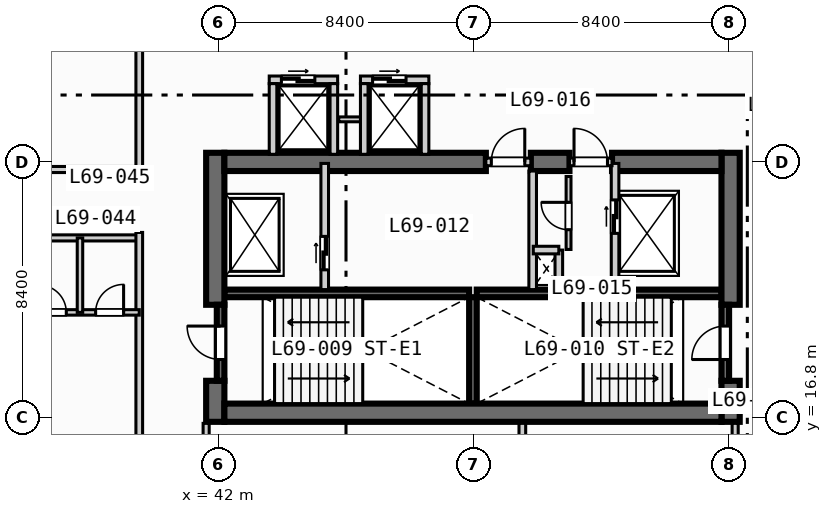
"""IFC4 building model, lengths in metres.
Left out: names, types, materials, properties, quantities, classifications, styles, units other than length and angle.
Written with IfcOpenShell. Run it as: python <this file> out.ifc"""

import sys

from ifc_helpers import new_model, si_unit, direction, frame, frame_2d, origin, place, context, subcontext, project, spatial, rectangle, extrude, element, fill, save


model = new_model("IFC4")
c1 = context("Model", 3, precision=1e-05, world=origin(), true_north=direction((0.0, 1.0)))
c2 = subcontext(c1, "Body", "Model", "MODEL_VIEW")
j1 = project(units=[si_unit("LENGTHUNIT", "METRE"), si_unit("PLANEANGLEUNIT", "RADIAN")], contexts=[c1])
p1 = place(None, origin())
s1 = spatial("IfcSite", under=j1, at=p1, CompositionType="ELEMENT")
p2 = place(p1, origin())
s2 = spatial("IfcBuilding", under=s1, at=p2, CompositionType="ELEMENT")
p3 = place(p2, frame((0.0, 0.0, 278.6)))
s3 = spatial("IfcBuildingStorey", under=s2, at=p3, CompositionType="ELEMENT", Elevation=278.6)
for number, where, z_axis, x_axis in (
    (1, (42.2, 20.875, 0.0), (0.0, 0.0, 1.0), (1.0, 0.0, 0.0)),
    (2, (50.5, 20.875, 0.0), (0.0, 0.0, 1.0), (1.0, 0.0, 0.0)),
):
    element("IfcWall", number, at=place(p3, frame(where, z_axis=z_axis, x_axis=x_axis)), inside=s3, PredefinedType="SOLIDWALL", context=c2, shape_type="SweptSolid", body=[
        extrude(rectangle(XDim=8.05, YDim=0.25, at=frame_2d((4.025, 0.0))), origin(), (0.0, 0.0, 1.0), 3.47),
    ])
p4 = place(p3, frame((50.375, 17.25, 0.0), z_axis=(0.0, 0.0, 1.0), x_axis=(0.0, 1.0, 0.0)))
e3 = element("IfcWall", 3, at=p4, inside=s3, PredefinedType="SOLIDWALL", context=c2, shape_type="SweptSolid", body=[
    extrude(rectangle(XDim=3.5, YDim=0.25, at=frame_2d((1.75, 0.0))), origin(), (0.0, 0.0, 1.0), 3.47),
])
p5 = place(p3, frame((41.9, 16.65, 0.0), z_axis=(0.0, 0.0, 1.0), x_axis=(0.0, 1.0, 0.0)))
e4 = element("IfcWall", 4, at=p5, inside=s3, PredefinedType="SHEAR", context=c2, shape_type="SweptSolid", body=[
    extrude(rectangle(XDim=1.35, YDim=0.6, at=frame_2d((0.675, 0.0))), origin(), (0.0, 0.0, 1.0), 3.47),
])
p6 = place(p3, frame((41.9, 20.5, 0.0), z_axis=(0.0, 0.0, 1.0), x_axis=(0.0, 1.0, 0.0)))
e5 = element("IfcWall", 5, at=p6, inside=s3, PredefinedType="SHEAR", context=c2, shape_type="SweptSolid", body=[
    extrude(rectangle(XDim=5.0, YDim=0.6, at=frame_2d((2.5, 0.0))), origin(), (0.0, 0.0, 1.0), 3.47),
])
p7 = place(p3, frame((58.85, 16.65, 0.0), z_axis=(0.0, 0.0, 1.0), x_axis=(0.0, 1.0, 0.0)))
e6 = element("IfcWall", 6, at=p7, inside=s3, PredefinedType="SHEAR", context=c2, shape_type="SweptSolid", body=[
    extrude(rectangle(XDim=1.35, YDim=0.6, at=frame_2d((0.675, 0.0))), origin(), (0.0, 0.0, 1.0), 3.47),
])
p8 = place(p3, frame((58.85, 20.5, 0.0), z_axis=(0.0, 0.0, 1.0), x_axis=(0.0, 1.0, 0.0)))
e7 = element("IfcWall", 7, at=p8, inside=s3, PredefinedType="SHEAR", context=c2, shape_type="SweptSolid", body=[
    extrude(rectangle(XDim=5.0, YDim=0.6, at=frame_2d((2.5, 0.0))), origin(), (0.0, 0.0, 1.0), 3.47),
])
p9 = place(p3, frame((42.2, 16.95, 0.0), z_axis=(0.0, 0.0, 1.0), x_axis=(1.0, 0.0, 0.0)))
e8 = element("IfcWall", 8, at=p9, inside=s3, PredefinedType="SHEAR", context=c2, shape_type="SweptSolid", body=[
    extrude(rectangle(XDim=16.35, YDim=0.6, at=frame_2d((8.175, 0.0))), origin(), (0.0, 0.0, 1.0), 3.47),
])
p10 = place(p3, frame((42.2, 25.2, 0.0), z_axis=(0.0, 0.0, 1.0), x_axis=(1.0, 0.0, 0.0)))
e9 = element("IfcWall", 9, at=p10, inside=s3, PredefinedType="SHEAR", context=c2, shape_type="SweptSolid", body=[
    extrude(rectangle(XDim=8.6, YDim=0.6, at=frame_2d((4.3, 0.0))), origin(), (0.0, 0.0, 1.0), 3.47),
])
p11 = place(p3, frame((52.28, 25.2, 0.0), z_axis=(0.0, 0.0, 1.0), x_axis=(1.0, 0.0, 0.0)))
e10 = element("IfcWall", 10, at=p11, inside=s3, PredefinedType="SHEAR", context=c2, shape_type="SweptSolid", body=[
    extrude(rectangle(XDim=1.27, YDim=0.6, at=frame_2d((0.635, 0.0))), origin(), (0.0, 0.0, 1.0), 3.47),
])
p12 = place(p3, frame((54.95, 25.2, 0.0), z_axis=(0.0, 0.0, 1.0), x_axis=(1.0, 0.0, 0.0)))
e11 = element("IfcWall", 11, at=p12, inside=s3, PredefinedType="SHEAR", context=c2, shape_type="SweptSolid", body=[
    extrude(rectangle(XDim=3.6, YDim=0.6, at=frame_2d((1.8, 0.0))), origin(), (0.0, 0.0, 1.0), 3.47),
])
p13 = place(p3, frame((42.075, 18.0, 0.0), z_axis=(0.0, 0.0, 1.0), x_axis=(0.0, 1.0, 0.0)))
e12 = element("IfcWall", 12, at=p13, inside=s3, PredefinedType="SOLIDWALL", context=c2, shape_type="SweptSolid", body=[
    extrude(rectangle(XDim=2.5, YDim=0.25, at=frame_2d((1.25, 0.0))), origin(), (0.0, 0.0, 1.0), 3.47),
])
p14 = place(p13, frame((0.7, 0.0, 0.0)))
e13 = element("IfcOpeningElement", 13, at=p14, cuts=e12, PredefinedType="OPENING", context=c2, shape_type="SweptSolid", body=[
    extrude(rectangle(XDim=1.1, YDim=2.15, at=frame_2d((0.55, 1.075))), frame((0.0, 0.135, 0.0), z_axis=(0.0, -1.0, 0.0), x_axis=(1.0, 0.0, 0.0)), (0.0, 0.0, 1.0), 0.27),
])
p15 = place(p3, frame((58.675, 18.0, 0.0), z_axis=(0.0, 0.0, 1.0), x_axis=(0.0, 1.0, 0.0)))
e14 = element("IfcWall", 14, at=p15, inside=s3, PredefinedType="SOLIDWALL", context=c2, shape_type="SweptSolid", body=[
    extrude(rectangle(XDim=2.5, YDim=0.25, at=frame_2d((1.25, 0.0))), origin(), (0.0, 0.0, 1.0), 3.47),
])
p16 = place(p15, frame((0.7, 0.0, 0.0)))
e15 = element("IfcOpeningElement", 15, at=p16, cuts=e14, PredefinedType="OPENING", context=c2, shape_type="SweptSolid", body=[
    extrude(rectangle(XDim=1.1, YDim=2.15, at=frame_2d((0.55, 1.075))), frame((0.0, 0.135, 0.0), z_axis=(0.0, -1.0, 0.0), x_axis=(1.0, 0.0, 0.0)), (0.0, 0.0, 1.0), 0.27),
])
p17 = place(p3, frame((45.5, 21.0, 0.0), z_axis=(0.0, 0.0, 1.0), x_axis=(0.0, 1.0, 0.0)))
e16 = element("IfcWall", 16, at=p17, inside=s3, PredefinedType="SOLIDWALL", context=c2, shape_type="SweptSolid", body=[
    extrude(rectangle(XDim=4.15, YDim=0.25, at=frame_2d((2.075, 0.0))), origin(), (0.0, 0.0, 1.0), 3.47),
])
p18 = place(p17, frame((0.65, 0.0, 0.0)))
e17 = element("IfcOpeningElement", 17, at=p18, cuts=e16, PredefinedType="OPENING", context=c2, shape_type="SweptSolid", body=[
    extrude(rectangle(XDim=1.1, YDim=2.15, at=frame_2d((0.55, 1.075))), frame((0.0, 0.135, 0.0), z_axis=(0.0, -1.0, 0.0), x_axis=(1.0, 0.0, 0.0)), (0.0, 0.0, 1.0), 0.27),
])
p19 = place(p3, frame((50.8, 25.2, 0.0), z_axis=(0.0, 0.0, 1.0), x_axis=(1.0, 0.0, 0.0)))
e18 = element("IfcWall", 18, at=p19, inside=s3, PredefinedType="SOLIDWALL", context=c2, shape_type="SweptSolid", body=[
    extrude(rectangle(XDim=1.48, YDim=0.25, at=frame_2d((0.74, 0.0))), origin(), (0.0, 0.0, 1.0), 3.47),
])
p20 = place(p19, frame((0.18, 0.0, 0.0)))
e19 = element("IfcOpeningElement", 19, at=p20, cuts=e18, PredefinedType="OPENING", context=c2, shape_type="SweptSolid", body=[
    extrude(rectangle(XDim=1.1, YDim=2.15, at=frame_2d((0.55, 1.075))), frame((0.0, 0.135, 0.0), z_axis=(0.0, -1.0, 0.0), x_axis=(1.0, 0.0, 0.0)), (0.0, 0.0, 1.0), 0.27),
])
p21 = place(p3, frame((52.34, 21.0, 0.0), z_axis=(0.0, 0.0, 1.0), x_axis=(0.0, 1.0, 0.0)))
e20 = element("IfcWall", 20, at=p21, inside=s3, PredefinedType="SOLIDWALL", context=c2, shape_type="SweptSolid", body=[
    extrude(rectangle(XDim=3.9, YDim=0.25, at=frame_2d((1.95, 0.0))), origin(), (0.0, 0.0, 1.0), 3.47),
])
p22 = place(p3, frame((55.05, 21.0, 0.0), z_axis=(0.0, 0.0, 1.0), x_axis=(0.0, 1.0, 0.0)))
e21 = element("IfcWall", 21, at=p22, inside=s3, PredefinedType="SOLIDWALL", context=c2, shape_type="SweptSolid", body=[
    extrude(rectangle(XDim=4.15, YDim=0.25, at=frame_2d((2.075, 0.0))), origin(), (0.0, 0.0, 1.0), 3.47),
])
p23 = place(p22, frame((1.85, 0.0, 0.0)))
e22 = element("IfcOpeningElement", 22, at=p23, cuts=e21, PredefinedType="OPENING", context=c2, shape_type="SweptSolid", body=[
    extrude(rectangle(XDim=1.1, YDim=2.15, at=frame_2d((0.55, 1.075))), frame((0.0, 0.135, 0.0), z_axis=(0.0, -1.0, 0.0), x_axis=(1.0, 0.0, 0.0)), (0.0, 0.0, 1.0), 0.27),
])
p24 = place(p3, frame((53.55, 25.2, 0.0), z_axis=(0.0, 0.0, 1.0), x_axis=(1.0, 0.0, 0.0)))
e23 = element("IfcWall", 23, at=p24, inside=s3, PredefinedType="SOLIDWALL", context=c2, shape_type="SweptSolid", body=[
    extrude(rectangle(XDim=1.4, YDim=0.25, at=frame_2d((0.7, 0.0))), origin(), (0.0, 0.0, 1.0), 3.47),
])
p25 = place(p24, frame((0.15, 0.0, 0.0)))
e24 = element("IfcOpeningElement", 24, at=p25, cuts=e23, PredefinedType="OPENING", context=c2, shape_type="SweptSolid", body=[
    extrude(rectangle(XDim=1.1, YDim=2.15, at=frame_2d((0.55, 1.075))), frame((0.0, 0.135, 0.0), z_axis=(0.0, -1.0, 0.0), x_axis=(1.0, 0.0, 0.0)), (0.0, 0.0, 1.0), 0.27),
])
p26 = place(p3, frame((53.2, 21.0, 0.0), z_axis=(0.0, 0.0, 1.0), x_axis=(0.0, 1.0, 0.0)))
e25 = element("IfcWall", 25, at=p26, inside=s3, PredefinedType="SOLIDWALL", context=c2, shape_type="SweptSolid", body=[
    extrude(rectangle(XDim=1.3, YDim=0.25, at=frame_2d((0.65, 0.0))), origin(), (0.0, 0.0, 1.0), 3.47),
])
p27 = place(p3, frame((52.36, 22.3, 0.0), z_axis=(0.0, 0.0, 1.0), x_axis=(1.0, 0.0, 0.0)))
e26 = element("IfcWall", 26, at=p27, inside=s3, PredefinedType="SOLIDWALL", context=c2, shape_type="SweptSolid", body=[
    extrude(rectangle(XDim=0.84, YDim=0.25, at=frame_2d((0.42, 0.0))), origin(), (0.0, 0.0, 1.0), 3.47),
])
p28 = place(p3, frame((53.52, 22.32, 0.0), z_axis=(0.0, 0.0, 1.0), x_axis=(0.0, 1.0, 0.0)))
e27 = element("IfcWall", 27, at=p28, inside=s3, PredefinedType="PARTITIONING", context=c2, shape_type="SweptSolid", body=[
    extrude(rectangle(XDim=2.4, YDim=0.16, at=frame_2d((1.2, 0.0))), origin(), (0.0, 0.0, 1.0), 3.47),
])
p29 = place(p28, frame((0.65, 0.0, 0.0)))
e28 = element("IfcOpeningElement", 28, at=p29, cuts=e27, PredefinedType="OPENING", context=c2, shape_type="SweptSolid", body=[
    extrude(rectangle(XDim=0.9, YDim=2.1, at=frame_2d((0.45, 1.05))), frame((0.0, 0.09, 0.0), z_axis=(0.0, -1.0, 0.0), x_axis=(1.0, 0.0, 0.0)), (0.0, 0.0, 1.0), 0.18),
])
p30 = place(p3, frame((43.675, 27.9, 0.0), z_axis=(0.0, 0.0, 1.0), x_axis=(1.0, 0.0, 0.0)))
e29 = element("IfcWall", 29, at=p30, inside=s3, PredefinedType="SOLIDWALL", context=c2, shape_type="SweptSolid", body=[
    extrude(rectangle(XDim=2.25, YDim=0.25, at=frame_2d((1.125, 0.0))), origin(), (0.0, 0.0, 1.0), 3.47),
])
p31 = place(p30, frame((0.4, 0.0, 0.0)))
e30 = element("IfcOpeningElement", 30, at=p31, cuts=e29, PredefinedType="OPENING", context=c2, shape_type="SweptSolid", body=[
    extrude(rectangle(XDim=1.1, YDim=2.15, at=frame_2d((0.55, 1.075))), frame((0.0, 0.135, 0.0), z_axis=(0.0, -1.0, 0.0), x_axis=(1.0, 0.0, 0.0)), (0.0, 0.0, 1.0), 0.27),
])
for number, where, z_axis, x_axis in (
    (31, (43.8, 25.45, 0.0), (0.0, 0.0, 1.0), (0.0, 1.0, 0.0)),
    (32, (45.8, 25.45, 0.0), (0.0, 0.0, 1.0), (0.0, 1.0, 0.0)),
):
    element("IfcWall", number, at=place(p3, frame(where, z_axis=z_axis, x_axis=x_axis)), inside=s3, PredefinedType="SOLIDWALL", context=c2, shape_type="SweptSolid", body=[
        extrude(rectangle(XDim=2.325, YDim=0.25, at=frame_2d((1.163, 0.0))), origin(), (0.0, 0.0, 1.0), 3.47),
    ])
p32 = place(p3, frame((45.96, 26.6, 0.0), z_axis=(0.0, 0.0, 1.0), x_axis=(1.0, 0.0, 0.0)))
e33 = element("IfcWall", 33, at=p32, inside=s3, PredefinedType="PARTITIONING", context=c2, shape_type="SweptSolid", body=[
    extrude(rectangle(XDim=0.88, YDim=0.16, at=frame_2d((0.44, 0.0))), origin(), (0.0, 0.0, 1.0), 3.47),
])
p33 = place(p3, frame((46.675, 27.9, 0.0), z_axis=(0.0, 0.0, 1.0), x_axis=(1.0, 0.0, 0.0)))
e34 = element("IfcWall", 34, at=p33, inside=s3, PredefinedType="SOLIDWALL", context=c2, shape_type="SweptSolid", body=[
    extrude(rectangle(XDim=2.25, YDim=0.25, at=frame_2d((1.125, 0.0))), origin(), (0.0, 0.0, 1.0), 3.47),
])
p34 = place(p33, frame((0.4, 0.0, 0.0)))
e35 = element("IfcOpeningElement", 35, at=p34, cuts=e34, PredefinedType="OPENING", context=c2, shape_type="SweptSolid", body=[
    extrude(rectangle(XDim=1.1, YDim=2.15, at=frame_2d((0.55, 1.075))), frame((0.0, 0.135, 0.0), z_axis=(0.0, -1.0, 0.0), x_axis=(1.0, 0.0, 0.0)), (0.0, 0.0, 1.0), 0.27),
])
for number, where, z_axis, x_axis in (
    (36, (46.8, 25.45, 0.0), (0.0, 0.0, 1.0), (0.0, 1.0, 0.0)),
    (37, (48.8, 25.45, 0.0), (0.0, 0.0, 1.0), (0.0, 1.0, 0.0)),
):
    element("IfcWall", number, at=place(p3, frame(where, z_axis=z_axis, x_axis=x_axis)), inside=s3, PredefinedType="SOLIDWALL", context=c2, shape_type="SweptSolid", body=[
        extrude(rectangle(XDim=2.325, YDim=0.25, at=frame_2d((1.163, 0.0))), origin(), (0.0, 0.0, 1.0), 3.47),
    ])
p35 = place(p3, frame((30.6, 24.95, 0.0), z_axis=(0.0, 0.0, 1.0), x_axis=(1.0, 0.0, 0.0)))
e38 = element("IfcWall", 38, at=p35, inside=s3, PredefinedType="PARTITIONING", context=c2, shape_type="SweptSolid", body=[
    extrude(rectangle(XDim=8.8, YDim=0.2, at=frame_2d((4.4, 0.0))), origin(), (0.0, 0.0, 1.0), 2.82),
])
p36 = place(p35, frame((3.75, 0.0, 0.0)))
e39 = element("IfcOpeningElement", 39, at=p36, cuts=e38, PredefinedType="OPENING", context=c2, shape_type="SweptSolid", body=[
    extrude(rectangle(XDim=0.92, YDim=2.1, at=frame_2d((0.46, 1.05))), frame((0.0, 0.11, 0.0), z_axis=(0.0, -1.0, 0.0), x_axis=(1.0, 0.0, 0.0)), (0.0, 0.0, 1.0), 0.22),
])
p37 = place(p3, frame((39.4, 24.95, 0.0), z_axis=(0.0, 0.0, 1.0), x_axis=(0.0, 1.0, 0.0)))
e40 = element("IfcWall", 40, at=p37, inside=s3, PredefinedType="PARTITIONING", context=c2, shape_type="SweptSolid", body=[
    extrude(rectangle(XDim=8.35, YDim=0.22, at=frame_2d((4.175, 0.0))), origin(), (0.0, 0.0, 1.0), 3.47),
])
p38 = place(p3, frame((41.6, 8.65, 0.0), z_axis=(0.0, 0.0, 1.0), x_axis=(0.0, 1.0, 0.0)))
e41 = element("IfcWall", 41, at=p38, inside=s3, PredefinedType="PARTITIONING", context=c2, shape_type="SweptSolid", body=[
    extrude(rectangle(XDim=7.95, YDim=0.2, at=frame_2d((3.975, 0.0))), origin(), (0.0, 0.0, 1.0), 3.47),
])
p39 = place(p38, frame((2.2, 0.0, 0.0)))
e42 = element("IfcOpeningElement", 42, at=p39, cuts=e41, PredefinedType="OPENING", context=c2, shape_type="SweptSolid", body=[
    extrude(rectangle(XDim=0.92, YDim=2.1, at=frame_2d((0.46, 1.05))), frame((0.0, 0.11, 0.0), z_axis=(0.0, -1.0, 0.0), x_axis=(1.0, 0.0, 0.0)), (0.0, 0.0, 1.0), 0.22),
])
p40 = place(p3, frame((59.0, 8.65, 0.0), z_axis=(0.0, 0.0, 1.0), x_axis=(0.0, 1.0, 0.0)))
e43 = element("IfcWall", 43, at=p40, inside=s3, PredefinedType="PARTITIONING", context=c2, shape_type="SweptSolid", body=[
    extrude(rectangle(XDim=7.95, YDim=0.2, at=frame_2d((3.975, 0.0))), origin(), (0.0, 0.0, 1.0), 2.82),
])
p41 = place(p40, frame((2.2, 0.0, 0.0)))
e44 = element("IfcOpeningElement", 44, at=p41, cuts=e43, PredefinedType="OPENING", context=c2, shape_type="SweptSolid", body=[
    extrude(rectangle(XDim=0.92, YDim=2.1, at=frame_2d((0.46, 1.05))), frame((0.0, 0.11, 0.0), z_axis=(0.0, -1.0, 0.0), x_axis=(1.0, 0.0, 0.0)), (0.0, 0.0, 1.0), 0.22),
])
p42 = place(p3, frame((52.0, 8.65, 0.0), z_axis=(0.0, 0.0, 1.0), x_axis=(0.0, 1.0, 0.0)))
e45 = element("IfcWall", 45, at=p42, inside=s3, PredefinedType="PARTITIONING", context=c2, shape_type="SweptSolid", body=[
    extrude(rectangle(XDim=7.95, YDim=0.22, at=frame_2d((3.975, 0.0))), origin(), (0.0, 0.0, 1.0), 3.47),
])
p43 = place(p3, frame((11.8, 22.7, 0.0), z_axis=(0.0, 0.0, 1.0), x_axis=(1.0, 0.0, 0.0)))
e46 = element("IfcWall", 46, at=p43, inside=s3, PredefinedType="PARTITIONING", context=c2, shape_type="SweptSolid", body=[
    extrude(rectangle(XDim=27.6, YDim=0.2, at=frame_2d((13.8, 0.0))), origin(), (0.0, 0.0, 1.0), 3.47),
])
p44 = place(p43, frame((0.445, 0.0, 0.0)))
e47 = element("IfcOpeningElement", 47, at=p44, cuts=e46, PredefinedType="OPENING", context=c2, shape_type="SweptSolid", body=[
    extrude(rectangle(XDim=1.0, YDim=2.15, at=frame_2d((0.5, 1.075))), frame((0.0, 0.11, 0.0), z_axis=(0.0, -1.0, 0.0), x_axis=(1.0, 0.0, 0.0)), (0.0, 0.0, 1.0), 0.22),
])
p45 = place(p43, frame((5.945, 0.0, 0.0)))
e48 = element("IfcOpeningElement", 48, at=p45, cuts=e46, PredefinedType="OPENING", context=c2, shape_type="SweptSolid", body=[
    extrude(rectangle(XDim=1.0, YDim=2.15, at=frame_2d((0.5, 1.075))), frame((0.0, 0.11, 0.0), z_axis=(0.0, -1.0, 0.0), x_axis=(1.0, 0.0, 0.0)), (0.0, 0.0, 1.0), 0.22),
])
p46 = place(p43, frame((11.445, 0.0, 0.0)))
e49 = element("IfcOpeningElement", 49, at=p46, cuts=e46, PredefinedType="OPENING", context=c2, shape_type="SweptSolid", body=[
    extrude(rectangle(XDim=1.0, YDim=2.15, at=frame_2d((0.5, 1.075))), frame((0.0, 0.11, 0.0), z_axis=(0.0, -1.0, 0.0), x_axis=(1.0, 0.0, 0.0)), (0.0, 0.0, 1.0), 0.22),
])
p47 = place(p43, frame((16.945, 0.0, 0.0)))
e50 = element("IfcOpeningElement", 50, at=p47, cuts=e46, PredefinedType="OPENING", context=c2, shape_type="SweptSolid", body=[
    extrude(rectangle(XDim=1.0, YDim=2.15, at=frame_2d((0.5, 1.075))), frame((0.0, 0.11, 0.0), z_axis=(0.0, -1.0, 0.0), x_axis=(1.0, 0.0, 0.0)), (0.0, 0.0, 1.0), 0.22),
])
p48 = place(p43, frame((22.445, 0.0, 0.0)))
e51 = element("IfcOpeningElement", 51, at=p48, cuts=e46, PredefinedType="OPENING", context=c2, shape_type="SweptSolid", body=[
    extrude(rectangle(XDim=1.0, YDim=2.15, at=frame_2d((0.5, 1.075))), frame((0.0, 0.11, 0.0), z_axis=(0.0, -1.0, 0.0), x_axis=(1.0, 0.0, 0.0)), (0.0, 0.0, 1.0), 0.22),
])
p49 = place(p3, frame((39.4, 8.6, 0.0), z_axis=(0.0, 0.0, 1.0), x_axis=(0.0, 1.0, 0.0)))
e52 = element("IfcWall", 52, at=p49, inside=s3, PredefinedType="PARTITIONING", context=c2, shape_type="SweptSolid", body=[
    extrude(rectangle(XDim=14.28, YDim=0.22, at=frame_2d((7.14, 0.0))), origin(), (0.0, 0.0, 1.0), 3.47),
])
p50 = place(p3, frame((35.65, 20.25, 0.0), z_axis=(0.0, 0.0, 1.0), x_axis=(1.0, 0.0, 0.0)))
e53 = element("IfcWall", 53, at=p50, inside=s3, PredefinedType="PLUMBINGWALL", context=c2, shape_type="SweptSolid", body=[
    extrude(rectangle(XDim=3.75, YDim=0.18, at=frame_2d((1.875, 0.0))), origin(), (0.0, 0.0, 1.0), 3.47),
])
p51 = place(p50, frame((0.45, 0.0, 0.0)))
e54 = element("IfcOpeningElement", 54, at=p51, cuts=e53, PredefinedType="OPENING", context=c2, shape_type="SweptSolid", body=[
    extrude(rectangle(XDim=0.9, YDim=2.1, at=frame_2d((0.45, 1.05))), frame((0.0, 0.1, 0.0), z_axis=(0.0, -1.0, 0.0), x_axis=(1.0, 0.0, 0.0)), (0.0, 0.0, 1.0), 0.2),
])
p52 = place(p50, frame((2.315, 0.0, 0.0)))
e55 = element("IfcOpeningElement", 55, at=p52, cuts=e53, PredefinedType="OPENING", context=c2, shape_type="SweptSolid", body=[
    extrude(rectangle(XDim=0.92, YDim=2.1, at=frame_2d((0.46, 1.05))), frame((0.0, 0.1, 0.0), z_axis=(0.0, -1.0, 0.0), x_axis=(1.0, 0.0, 0.0)), (0.0, 0.0, 1.0), 0.2),
])
p53 = place(p3, frame((37.45, 20.25, 0.0), z_axis=(0.0, 0.0, 1.0), x_axis=(0.0, 1.0, 0.0)))
e56 = element("IfcWall", 56, at=p53, inside=s3, PredefinedType="PLUMBINGWALL", context=c2, shape_type="SweptSolid", body=[
    extrude(rectangle(XDim=2.45, YDim=0.18, at=frame_2d((1.225, 0.0))), origin(), (0.0, 0.0, 1.0), 3.47),
])
p54 = place(p14, origin())
e57 = element("IfcDoor", 57, at=p54, inside=s3, OperationType="SINGLE_SWING_RIGHT", PredefinedType="DOOR", context=c2, shape_type="SweptSolid", body=[
    extrude(rectangle(XDim=1.1, YDim=2.15, at=frame_2d((0.55, 1.075))), frame((0.0, 0.025, 0.0), z_axis=(0.0, -1.0, 0.0), x_axis=(1.0, 0.0, 0.0)), (0.0, 0.0, 1.0), 0.05),
])
fill(e13, e57)
p55 = place(p16, origin())
e58 = element("IfcDoor", 58, at=p55, inside=s3, OperationType="SINGLE_SWING_LEFT", PredefinedType="DOOR", context=c2, shape_type="SweptSolid", body=[
    extrude(rectangle(XDim=1.1, YDim=2.15, at=frame_2d((0.55, 1.075))), frame((0.0, 0.025, 0.0), z_axis=(0.0, -1.0, 0.0), x_axis=(1.0, 0.0, 0.0)), (0.0, 0.0, 1.0), 0.05),
])
fill(e15, e58)
p56 = place(p18, origin())
e59 = element("IfcDoor", 59, at=p56, inside=s3, OperationType="SLIDING_TO_LEFT", PredefinedType="DOOR", context=c2, shape_type="SweptSolid", body=[
    extrude(rectangle(XDim=1.1, YDim=2.15, at=frame_2d((0.55, 1.075))), frame((0.0, 0.025, 0.0), z_axis=(0.0, -1.0, 0.0), x_axis=(1.0, 0.0, 0.0)), (0.0, 0.0, 1.0), 0.05),
])
fill(e17, e59)
p57 = place(p20, origin())
e60 = element("IfcDoor", 60, at=p57, inside=s3, OperationType="SINGLE_SWING_RIGHT", PredefinedType="DOOR", context=c2, shape_type="SweptSolid", body=[
    extrude(rectangle(XDim=1.1, YDim=2.15, at=frame_2d((0.55, 1.075))), frame((0.0, 0.025, 0.0), z_axis=(0.0, -1.0, 0.0), x_axis=(1.0, 0.0, 0.0)), (0.0, 0.0, 1.0), 0.05),
])
fill(e19, e60)
p58 = place(p23, origin())
e61 = element("IfcDoor", 61, at=p58, inside=s3, OperationType="SLIDING_TO_LEFT", PredefinedType="DOOR", context=c2, shape_type="SweptSolid", body=[
    extrude(rectangle(XDim=1.1, YDim=2.15, at=frame_2d((0.55, 1.075))), frame((0.0, 0.025, 0.0), z_axis=(0.0, -1.0, 0.0), x_axis=(1.0, 0.0, 0.0)), (0.0, 0.0, 1.0), 0.05),
])
fill(e22, e61)
p59 = place(p25, origin())
e62 = element("IfcDoor", 62, at=p59, inside=s3, OperationType="SINGLE_SWING_LEFT", PredefinedType="DOOR", context=c2, shape_type="SweptSolid", body=[
    extrude(rectangle(XDim=1.1, YDim=2.15, at=frame_2d((0.55, 1.075))), frame((0.0, 0.025, 0.0), z_axis=(0.0, -1.0, 0.0), x_axis=(1.0, 0.0, 0.0)), (0.0, 0.0, 1.0), 0.05),
])
fill(e24, e62)
p60 = place(p29, origin())
e63 = element("IfcDoor", 63, at=p60, inside=s3, OperationType="SINGLE_SWING_RIGHT", PredefinedType="DOOR", context=c2, shape_type="SweptSolid", body=[
    extrude(rectangle(XDim=0.9, YDim=2.1, at=frame_2d((0.45, 1.05))), frame((0.0, 0.025, 0.0), z_axis=(0.0, -1.0, 0.0), x_axis=(1.0, 0.0, 0.0)), (0.0, 0.0, 1.0), 0.05),
])
fill(e28, e63)
p61 = place(p31, origin())
e64 = element("IfcDoor", 64, at=p61, inside=s3, OperationType="SLIDING_TO_LEFT", PredefinedType="DOOR", context=c2, shape_type="SweptSolid", body=[
    extrude(rectangle(XDim=1.1, YDim=2.15, at=frame_2d((0.55, 1.075))), frame((0.0, 0.025, 0.0), z_axis=(0.0, -1.0, 0.0), x_axis=(1.0, 0.0, 0.0)), (0.0, 0.0, 1.0), 0.05),
])
fill(e30, e64)
p62 = place(p34, origin())
e65 = element("IfcDoor", 65, at=p62, inside=s3, OperationType="SLIDING_TO_LEFT", PredefinedType="DOOR", context=c2, shape_type="SweptSolid", body=[
    extrude(rectangle(XDim=1.1, YDim=2.15, at=frame_2d((0.55, 1.075))), frame((0.0, 0.025, 0.0), z_axis=(0.0, -1.0, 0.0), x_axis=(1.0, 0.0, 0.0)), (0.0, 0.0, 1.0), 0.05),
])
fill(e35, e65)
p63 = place(p51, origin())
e66 = element("IfcDoor", 66, at=p63, inside=s3, OperationType="SINGLE_SWING_LEFT", PredefinedType="DOOR", context=c2, shape_type="SweptSolid", body=[
    extrude(rectangle(XDim=0.9, YDim=2.1, at=frame_2d((0.45, 1.05))), frame((0.0, 0.025, 0.0), z_axis=(0.0, -1.0, 0.0), x_axis=(1.0, 0.0, 0.0)), (0.0, 0.0, 1.0), 0.05),
])
fill(e54, e66)
p64 = place(p52, origin())
e67 = element("IfcDoor", 67, at=p64, inside=s3, OperationType="SINGLE_SWING_RIGHT", PredefinedType="DOOR", context=c2, shape_type="SweptSolid", body=[
    extrude(rectangle(XDim=0.92, YDim=2.1, at=frame_2d((0.46, 1.05))), frame((0.0, 0.025, 0.0), z_axis=(0.0, -1.0, 0.0), x_axis=(1.0, 0.0, 0.0)), (0.0, 0.0, 1.0), 0.05),
])
fill(e55, e67)
save(model, sys.argv[1])
